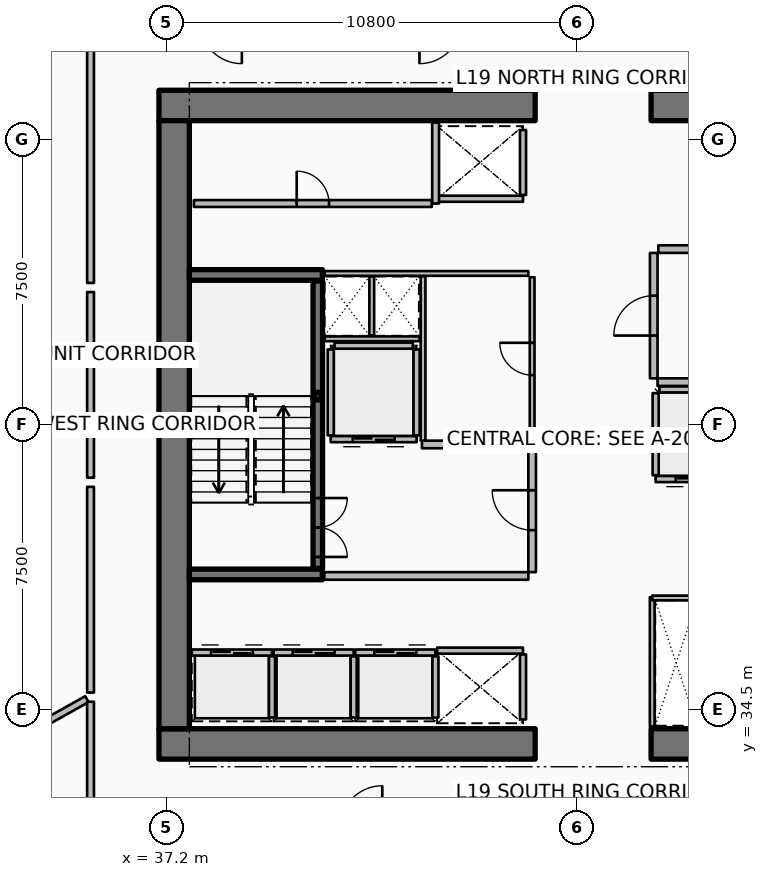
"""IFC4 building model, lengths in metres.
Left out: names, types, materials, properties, quantities, classifications, styles, units other than length and angle.
Written with IfcOpenShell. Run it as: python <this file> out.ifc"""

import sys

from ifc_helpers import new_model, si_unit, direction, frame, frame_2d, origin, origin_2d, place, context, subcontext, project, spatial, rectangle, hollow_rectangle, extrude, element, fill, save


model = new_model("IFC4")
c1 = context("Model", 3, precision=1e-05, world=origin(), true_north=direction((0.0, 1.0)))
c2 = subcontext(c1, "Body", "Model", "MODEL_VIEW")
j1 = project(units=[si_unit("LENGTHUNIT", "METRE"), si_unit("PLANEANGLEUNIT", "RADIAN")], contexts=[c1])
p1 = place(None, origin())
s1 = spatial("IfcSite", under=j1, at=p1, CompositionType="ELEMENT")
p2 = place(p1, origin())
s2 = spatial("IfcBuilding", under=s1, at=p2, CompositionType="ELEMENT")
p3 = place(p2, frame((0.0, 0.0, 78.9)))
s3 = spatial("IfcBuildingStorey", under=s2, at=p3, CompositionType="ELEMENT", Elevation=78.9)
p4 = place(p3, frame((37.0, 33.6, 0.0), z_axis=(0.0, 0.0, 1.0), x_axis=(1.0, 0.0, 0.0)))
e1 = element("IfcWall", 1, at=p4, inside=s3, PredefinedType="SHEAR", context=c2, shape_type="SweptSolid", body=[
    extrude(rectangle(XDim=9.9, YDim=0.8, at=frame_2d((4.95, 0.0))), origin(), (0.0, 0.0, 1.0), 3.75),
])
p5 = place(p3, frame((49.95, 33.6, 0.0), z_axis=(0.0, 0.0, 1.0), x_axis=(1.0, 0.0, 0.0)))
e2 = element("IfcWall", 2, at=p5, inside=s3, PredefinedType="SHEAR", context=c2, shape_type="SweptSolid", body=[
    extrude(rectangle(XDim=9.9, YDim=0.8, at=frame_2d((4.95, 0.0))), origin(), (0.0, 0.0, 1.0), 3.75),
])
p6 = place(p3, frame((37.0, 50.4, 0.0), z_axis=(0.0, 0.0, 1.0), x_axis=(1.0, 0.0, 0.0)))
e3 = element("IfcWall", 3, at=p6, inside=s3, PredefinedType="SHEAR", context=c2, shape_type="SweptSolid", body=[
    extrude(rectangle(XDim=9.9, YDim=0.8, at=frame_2d((4.95, 0.0))), origin(), (0.0, 0.0, 1.0), 3.75),
])
p7 = place(p3, frame((49.95, 50.4, 0.0), z_axis=(0.0, 0.0, 1.0), x_axis=(1.0, 0.0, 0.0)))
e4 = element("IfcWall", 4, at=p7, inside=s3, PredefinedType="SHEAR", context=c2, shape_type="SweptSolid", body=[
    extrude(rectangle(XDim=9.9, YDim=0.8, at=frame_2d((4.95, 0.0))), origin(), (0.0, 0.0, 1.0), 3.75),
])
p8 = place(p3, frame((37.4, 34.0, 0.0), z_axis=(0.0, 0.0, 1.0), x_axis=(0.0, 1.0, 0.0)))
e5 = element("IfcWall", 5, at=p8, inside=s3, PredefinedType="SHEAR", context=c2, shape_type="SweptSolid", body=[
    extrude(rectangle(XDim=16.0, YDim=0.8, at=frame_2d((8.0, 0.0))), origin(), (0.0, 0.0, 1.0), 3.75),
])
for number, where, z_axis, x_axis in (
    (6, (37.8, 38.06, 0.0), (0.0, 0.0, 1.0), (1.0, 0.0, 0.0)),
    (7, (37.8, 45.94, 0.0), (0.0, 0.0, 1.0), (1.0, 0.0, 0.0)),
):
    element("IfcWall", number, at=place(p3, frame(where, z_axis=z_axis, x_axis=x_axis)), inside=s3, PredefinedType="SHEAR", context=c2, shape_type="SweptSolid", body=[
        extrude(rectangle(XDim=3.5, YDim=0.28, at=frame_2d((1.75, 0.0))), origin(), (0.0, 0.0, 1.0), 3.75),
    ])
p9 = place(p3, frame((41.18, 42.75, 0.0), z_axis=(0.0, 0.0, 1.0), x_axis=(1.0, 0.0, 0.0)))
e8 = element("IfcColumn", 8, at=p9, inside=s3, PredefinedType="COLUMN", context=c2, shape_type="SweptSolid", body=[
    extrude(hollow_rectangle(XDim=0.2, YDim=0.2, WallThickness=0.01, InnerFilletRadius=0.01, OuterFilletRadius=0.02, at=origin_2d()), origin(), (0.0, 0.0, 1.0), 1.67),
])
p10 = place(p3, frame((41.18, 38.22, 0.0), z_axis=(0.0, 0.0, 1.0), x_axis=(0.0, 1.0, 0.0)))
e9 = element("IfcWall", 9, at=p10, inside=s3, PredefinedType="SOLIDWALL", context=c2, shape_type="SweptSolid", body=[
    extrude(rectangle(XDim=7.56, YDim=0.25, at=frame_2d((3.78, 0.0))), origin(), (0.0, 0.0, 1.0), 3.5),
])
p11 = place(p10, frame((0.3, 0.0, 0.0)))
e10 = element("IfcOpeningElement", 10, at=p11, cuts=e9, PredefinedType="OPENING", context=c2, shape_type="SweptSolid", body=[
    extrude(rectangle(XDim=1.55, YDim=2.15, at=frame_2d((0.775, 1.075))), frame((0.0, 0.135, 0.0), z_axis=(0.0, -1.0, 0.0), x_axis=(1.0, 0.0, 0.0)), (0.0, 0.0, 1.0), 0.27),
])
p12 = place(p3, frame((37.865, 36.005, 0.0), z_axis=(0.0, 0.0, 1.0), x_axis=(1.0, 0.0, 0.0)))
e11 = element("IfcWall", 11, at=p12, inside=s3, PredefinedType="PARTITIONING", context=c2, shape_type="SweptSolid", body=[
    extrude(rectangle(XDim=2.11, YDim=0.16, at=frame_2d((1.055, 0.0))), origin(), (0.0, 0.0, 1.0), 3.5),
])
p13 = place(p12, frame((0.505, 0.0, 0.0)))
e12 = element("IfcOpeningElement", 12, at=p13, cuts=e11, PredefinedType="OPENING", context=c2, shape_type="SweptSolid", body=[
    extrude(rectangle(XDim=1.1, YDim=2.1, at=frame_2d((0.55, 1.05))), frame((0.0, 0.09, 0.0), z_axis=(0.0, -1.0, 0.0), x_axis=(1.0, 0.0, 0.0)), (0.0, 0.0, 1.0), 0.18),
])
p14 = place(p3, frame((39.975, 34.295, 0.0), z_axis=(0.0, 0.0, 1.0), x_axis=(0.0, 1.0, 0.0)))
e13 = element("IfcWall", 13, at=p14, inside=s3, PredefinedType="PARTITIONING", context=c2, shape_type="SweptSolid", body=[
    extrude(rectangle(XDim=1.61, YDim=0.16, at=frame_2d((0.805, 0.0))), origin(), (0.0, 0.0, 1.0), 3.5),
])
p15 = place(p3, frame((40.015, 36.005, 0.0), z_axis=(0.0, 0.0, 1.0), x_axis=(1.0, 0.0, 0.0)))
e14 = element("IfcWall", 14, at=p15, inside=s3, PredefinedType="PARTITIONING", context=c2, shape_type="SweptSolid", body=[
    extrude(rectangle(XDim=2.11, YDim=0.16, at=frame_2d((1.055, 0.0))), origin(), (0.0, 0.0, 1.0), 3.5),
])
p16 = place(p15, frame((0.505, 0.0, 0.0)))
e15 = element("IfcOpeningElement", 15, at=p16, cuts=e14, PredefinedType="OPENING", context=c2, shape_type="SweptSolid", body=[
    extrude(rectangle(XDim=1.1, YDim=2.1, at=frame_2d((0.55, 1.05))), frame((0.0, 0.09, 0.0), z_axis=(0.0, -1.0, 0.0), x_axis=(1.0, 0.0, 0.0)), (0.0, 0.0, 1.0), 0.18),
])
p17 = place(p3, frame((42.125, 34.295, 0.0), z_axis=(0.0, 0.0, 1.0), x_axis=(0.0, 1.0, 0.0)))
e16 = element("IfcWall", 16, at=p17, inside=s3, PredefinedType="PARTITIONING", context=c2, shape_type="SweptSolid", body=[
    extrude(rectangle(XDim=1.61, YDim=0.16, at=frame_2d((0.805, 0.0))), origin(), (0.0, 0.0, 1.0), 3.5),
])
p18 = place(p3, frame((42.165, 36.005, 0.0), z_axis=(0.0, 0.0, 1.0), x_axis=(1.0, 0.0, 0.0)))
e17 = element("IfcWall", 17, at=p18, inside=s3, PredefinedType="PARTITIONING", context=c2, shape_type="SweptSolid", body=[
    extrude(rectangle(XDim=2.11, YDim=0.16, at=frame_2d((1.055, 0.0))), origin(), (0.0, 0.0, 1.0), 3.5),
])
p19 = place(p18, frame((0.505, 0.0, 0.0)))
e18 = element("IfcOpeningElement", 18, at=p19, cuts=e17, PredefinedType="OPENING", context=c2, shape_type="SweptSolid", body=[
    extrude(rectangle(XDim=1.1, YDim=2.1, at=frame_2d((0.55, 1.05))), frame((0.0, 0.09, 0.0), z_axis=(0.0, -1.0, 0.0), x_axis=(1.0, 0.0, 0.0)), (0.0, 0.0, 1.0), 0.18),
])
p20 = place(p3, frame((44.275, 34.295, 0.0), z_axis=(0.0, 0.0, 1.0), x_axis=(0.0, 1.0, 0.0)))
e19 = element("IfcWall", 19, at=p20, inside=s3, PredefinedType="PARTITIONING", context=c2, shape_type="SweptSolid", body=[
    extrude(rectangle(XDim=1.61, YDim=0.16, at=frame_2d((0.805, 0.0))), origin(), (0.0, 0.0, 1.0), 3.5),
])
p21 = place(p3, frame((46.58, 47.945, 0.0), z_axis=(0.0, 0.0, 1.0), x_axis=(-1.0, 0.0, 0.0)))
e20 = element("IfcWall", 20, at=p21, inside=s3, PredefinedType="PARTITIONING", context=c2, shape_type="SweptSolid", body=[
    extrude(rectangle(XDim=2.26, YDim=0.16, at=frame_2d((1.13, 0.0))), origin(), (0.0, 0.0, 1.0), 3.5),
])
p22 = place(p3, frame((46.58, 48.045, 0.0), z_axis=(0.0, 0.0, 1.0), x_axis=(0.0, 1.0, 0.0)))
e21 = element("IfcWall", 21, at=p22, inside=s3, PredefinedType="PARTITIONING", context=c2, shape_type="SweptSolid", body=[
    extrude(rectangle(XDim=1.71, YDim=0.16, at=frame_2d((0.855, 0.0))), origin(), (0.0, 0.0, 1.0), 3.5),
])
p23 = place(p3, frame((44.32, 36.055, 0.0), z_axis=(0.0, 0.0, 1.0), x_axis=(1.0, 0.0, 0.0)))
e22 = element("IfcWall", 22, at=p23, inside=s3, PredefinedType="PARTITIONING", context=c2, shape_type="SweptSolid", body=[
    extrude(rectangle(XDim=2.26, YDim=0.16, at=frame_2d((1.13, 0.0))), origin(), (0.0, 0.0, 1.0), 3.5),
])
p24 = place(p3, frame((46.58, 34.245, 0.0), z_axis=(0.0, 0.0, 1.0), x_axis=(0.0, 1.0, 0.0)))
e23 = element("IfcWall", 23, at=p24, inside=s3, PredefinedType="PARTITIONING", context=c2, shape_type="SweptSolid", body=[
    extrude(rectangle(XDim=1.71, YDim=0.16, at=frame_2d((0.855, 0.0))), origin(), (0.0, 0.0, 1.0), 3.5),
])
p25 = place(p3, frame((43.78, 41.62, 0.0), z_axis=(0.0, 0.0, 1.0), x_axis=(-1.0, 0.0, 0.0)))
e24 = element("IfcWall", 24, at=p25, inside=s3, PredefinedType="PARTITIONING", context=c2, shape_type="SweptSolid", body=[
    extrude(rectangle(XDim=2.26, YDim=0.16, at=frame_2d((1.13, 0.0))), origin(), (0.0, 0.0, 1.0), 3.5),
])
p26 = place(p25, frame((0.58, 0.0, 0.0)))
e25 = element("IfcOpeningElement", 25, at=p26, cuts=e24, PredefinedType="OPENING", context=c2, shape_type="SweptSolid", body=[
    extrude(rectangle(XDim=1.1, YDim=2.1, at=frame_2d((0.55, 1.05))), frame((0.0, 0.09, 0.0), z_axis=(0.0, -1.0, 0.0), x_axis=(1.0, 0.0, 0.0)), (0.0, 0.0, 1.0), 0.18),
])
for number, where, z_axis, x_axis in (
    (26, (43.78, 41.72, 0.0), (0.0, 0.0, 1.0), (0.0, 1.0, 0.0)),
    (27, (41.52, 41.72, 0.0), (0.0, 0.0, 1.0), (0.0, 1.0, 0.0)),
):
    element("IfcWall", number, at=place(p3, frame(where, z_axis=z_axis, x_axis=x_axis)), inside=s3, PredefinedType="PARTITIONING", context=c2, shape_type="SweptSolid", body=[
        extrude(rectangle(XDim=2.26, YDim=0.16, at=frame_2d((1.13, 0.0))), origin(), (0.0, 0.0, 1.0), 3.5),
    ])
p27 = place(p3, frame((41.62, 44.08, 0.0), z_axis=(0.0, 0.0, 1.0), x_axis=(1.0, 0.0, 0.0)))
e28 = element("IfcWall", 28, at=p27, inside=s3, PredefinedType="PARTITIONING", context=c2, shape_type="SweptSolid", body=[
    extrude(rectangle(XDim=2.06, YDim=0.16, at=frame_2d((1.03, 0.0))), origin(), (0.0, 0.0, 1.0), 3.5),
])
p28 = place(p3, frame((52.23, 40.57, 0.0), z_axis=(0.0, 0.0, 1.0), x_axis=(-1.0, 0.0, 0.0)))
e29 = element("IfcWall", 29, at=p28, inside=s3, PredefinedType="PARTITIONING", context=c2, shape_type="SweptSolid", body=[
    extrude(rectangle(XDim=2.16, YDim=0.16, at=frame_2d((1.08, 0.0))), origin(), (0.0, 0.0, 1.0), 3.5),
])
p29 = place(p28, frame((0.53, 0.0, 0.0)))
e30 = element("IfcOpeningElement", 30, at=p29, cuts=e29, PredefinedType="OPENING", context=c2, shape_type="SweptSolid", body=[
    extrude(rectangle(XDim=1.1, YDim=2.1, at=frame_2d((0.55, 1.05))), frame((0.0, 0.09, 0.0), z_axis=(0.0, -1.0, 0.0), x_axis=(1.0, 0.0, 0.0)), (0.0, 0.0, 1.0), 0.18),
])
p30 = place(p3, frame((50.07, 40.67, 0.0), z_axis=(0.0, 0.0, 1.0), x_axis=(0.0, 1.0, 0.0)))
e31 = element("IfcWall", 31, at=p30, inside=s3, PredefinedType="PARTITIONING", context=c2, shape_type="SweptSolid", body=[
    extrude(rectangle(XDim=2.16, YDim=0.16, at=frame_2d((1.08, 0.0))), origin(), (0.0, 0.0, 1.0), 3.5),
])
p31 = place(p3, frame((50.17, 42.93, 0.0), z_axis=(0.0, 0.0, 1.0), x_axis=(1.0, 0.0, 0.0)))
e32 = element("IfcWall", 32, at=p31, inside=s3, PredefinedType="PARTITIONING", context=c2, shape_type="SweptSolid", body=[
    extrude(rectangle(XDim=1.96, YDim=0.16, at=frame_2d((0.98, 0.0))), origin(), (0.0, 0.0, 1.0), 3.5),
])
p32 = place(p3, frame((37.92, 47.82, 0.0), z_axis=(0.0, 0.0, 1.0), x_axis=(1.0, 0.0, 0.0)))
e33 = element("IfcWall", 33, at=p32, inside=s3, PredefinedType="PARTITIONING", context=c2, shape_type="SweptSolid", body=[
    extrude(rectangle(XDim=6.26, YDim=0.18, at=frame_2d((3.13, 0.0))), origin(), (0.0, 0.0, 1.0), 3.5),
])
p33 = place(p32, frame((2.705, 0.0, 0.0)))
e34 = element("IfcOpeningElement", 34, at=p33, cuts=e33, PredefinedType="OPENING", context=c2, shape_type="SweptSolid", body=[
    extrude(rectangle(XDim=0.85, YDim=2.06, at=frame_2d((0.425, 1.03))), frame((0.0, 0.1, 0.0), z_axis=(0.0, -1.0, 0.0), x_axis=(1.0, 0.0, 0.0)), (0.0, 0.0, 1.0), 0.2),
])
p34 = place(p3, frame((44.28, 47.82, 0.0), z_axis=(0.0, 0.0, 1.0), x_axis=(0.0, 1.0, 0.0)))
e35 = element("IfcWall", 35, at=p34, inside=s3, PredefinedType="PARTITIONING", context=c2, shape_type="SweptSolid", body=[
    extrude(rectangle(XDim=2.13, YDim=0.18, at=frame_2d((1.065, 0.0))), origin(), (0.0, 0.0, 1.0), 3.5),
])
p35 = place(p3, frame((41.35, 38.02, 0.0), z_axis=(0.0, 0.0, 1.0), x_axis=(1.0, 0.0, 0.0)))
e36 = element("IfcWall", 36, at=p35, inside=s3, PredefinedType="PARTITIONING", context=c2, shape_type="SweptSolid", body=[
    extrude(rectangle(XDim=5.37, YDim=0.2, at=frame_2d((2.685, 0.0))), origin(), (0.0, 0.0, 1.0), 3.5),
])
p36 = place(p3, frame((43.92, 41.48, 0.0), z_axis=(0.0, 0.0, 1.0), x_axis=(1.0, 0.0, 0.0)))
e37 = element("IfcWall", 37, at=p36, inside=s3, PredefinedType="PARTITIONING", context=c2, shape_type="SweptSolid", body=[
    extrude(rectangle(XDim=2.8, YDim=0.2, at=frame_2d((1.4, 0.0))), origin(), (0.0, 0.0, 1.0), 3.5),
])
p37 = place(p3, frame((46.82, 38.12, 0.0), z_axis=(0.0, 0.0, 1.0), x_axis=(0.0, 1.0, 0.0)))
e38 = element("IfcWall", 38, at=p37, inside=s3, PredefinedType="PARTITIONING", context=c2, shape_type="SweptSolid", body=[
    extrude(rectangle(XDim=3.26, YDim=0.2, at=frame_2d((1.63, 0.0))), origin(), (0.0, 0.0, 1.0), 3.5),
])
p38 = place(p37, frame((1.105, 0.0, 0.0)))
e39 = element("IfcOpeningElement", 39, at=p38, cuts=e38, PredefinedType="OPENING", context=c2, shape_type="SweptSolid", body=[
    extrude(rectangle(XDim=1.05, YDim=2.1, at=frame_2d((0.525, 1.05))), frame((0.0, 0.11, 0.0), z_axis=(0.0, -1.0, 0.0), x_axis=(1.0, 0.0, 0.0)), (0.0, 0.0, 1.0), 0.22),
])
p39 = place(p3, frame((50.12, 43.12, 0.0), z_axis=(0.0, 0.0, 1.0), x_axis=(1.0, 0.0, 0.0)))
e40 = element("IfcWall", 40, at=p39, inside=s3, PredefinedType="PARTITIONING", context=c2, shape_type="SweptSolid", body=[
    extrude(rectangle(XDim=8.88, YDim=0.2, at=frame_2d((4.44, 0.0))), origin(), (0.0, 0.0, 1.0), 3.5),
])
p40 = place(p3, frame((50.14, 46.62, 0.0), z_axis=(0.0, 0.0, 1.0), x_axis=(1.0, 0.0, 0.0)))
e41 = element("IfcWall", 41, at=p40, inside=s3, PredefinedType="PARTITIONING", context=c2, shape_type="SweptSolid", body=[
    extrude(rectangle(XDim=1.02, YDim=0.2, at=frame_2d((0.51, 0.0))), origin(), (0.0, 0.0, 1.0), 3.5),
])
p41 = place(p3, frame((50.02, 43.22, 0.0), z_axis=(0.0, 0.0, 1.0), x_axis=(0.0, 1.0, 0.0)))
e42 = element("IfcWall", 42, at=p41, inside=s3, PredefinedType="PARTITIONING", context=c2, shape_type="SweptSolid", body=[
    extrude(rectangle(XDim=3.3, YDim=0.2, at=frame_2d((1.65, 0.0))), origin(), (0.0, 0.0, 1.0), 3.5),
])
p42 = place(p41, frame((1.125, 0.0, 0.0)))
e43 = element("IfcOpeningElement", 43, at=p42, cuts=e42, PredefinedType="OPENING", context=c2, shape_type="SweptSolid", body=[
    extrude(rectangle(XDim=1.05, YDim=2.1, at=frame_2d((0.525, 1.05))), frame((0.0, 0.11, 0.0), z_axis=(0.0, -1.0, 0.0), x_axis=(1.0, 0.0, 0.0)), (0.0, 0.0, 1.0), 0.22),
])
p43 = place(p3, frame((41.36, 45.98, 0.0), z_axis=(0.0, 0.0, 1.0), x_axis=(1.0, 0.0, 0.0)))
e44 = element("IfcWall", 44, at=p43, inside=s3, PredefinedType="PARTITIONING", context=c2, shape_type="SweptSolid", body=[
    extrude(rectangle(XDim=5.36, YDim=0.125, at=frame_2d((2.68, 0.0))), origin(), (0.0, 0.0, 1.0), 2.94),
])
p44 = place(p3, frame((41.36, 44.26, 0.0), z_axis=(0.0, 0.0, 1.0), x_axis=(1.0, 0.0, 0.0)))
e45 = element("IfcWall", 45, at=p44, inside=s3, PredefinedType="PARTITIONING", context=c2, shape_type="SweptSolid", body=[
    extrude(rectangle(XDim=2.5, YDim=0.125, at=frame_2d((1.25, 0.0))), origin(), (0.0, 0.0, 1.0), 2.94),
])
p45 = place(p3, frame((42.6, 44.35, 0.0), z_axis=(0.0, 0.0, 1.0), x_axis=(0.0, 1.0, 0.0)))
e46 = element("IfcWall", 46, at=p45, inside=s3, PredefinedType="PARTITIONING", context=c2, shape_type="SweptSolid", body=[
    extrude(rectangle(XDim=1.55, YDim=0.125, at=frame_2d((0.775, 0.0))), origin(), (0.0, 0.0, 1.0), 2.94),
])
p46 = place(p3, frame((49.98, 34.06, 0.0), z_axis=(0.0, 0.0, 1.0), x_axis=(0.0, 1.0, 0.0)))
e47 = element("IfcWall", 47, at=p46, inside=s3, PredefinedType="PARTITIONING", context=c2, shape_type="SweptSolid", body=[
    extrude(rectangle(XDim=3.4, YDim=0.125, at=frame_2d((1.7, 0.0))), origin(), (0.0, 0.0, 1.0), 2.94),
])
p47 = place(p3, frame((49.98, 37.44, 0.0), z_axis=(0.0, 0.0, 1.0), x_axis=(1.0, 0.0, 0.0)))
e48 = element("IfcWall", 48, at=p47, inside=s3, PredefinedType="PARTITIONING", context=c2, shape_type="SweptSolid", body=[
    extrude(rectangle(XDim=1.26, YDim=0.125, at=frame_2d((0.63, 0.0))), origin(), (0.0, 0.0, 1.0), 2.94),
])
p48 = place(p3, frame((43.95, 41.58, 0.0), z_axis=(0.0, 0.0, 1.0), x_axis=(0.0, 1.0, 0.0)))
e49 = element("IfcWall", 49, at=p48, inside=s3, PredefinedType="PARTITIONING", context=c2, shape_type="SweptSolid", body=[
    extrude(rectangle(XDim=4.32, YDim=0.125, at=frame_2d((2.16, 0.0))), origin(), (0.0, 0.0, 1.0), 2.94),
])
p49 = place(p3, frame((46.82, 41.58, 0.0), z_axis=(0.0, 0.0, 1.0), x_axis=(0.0, 1.0, 0.0)))
e50 = element("IfcWall", 50, at=p49, inside=s3, PredefinedType="PARTITIONING", context=c2, shape_type="SweptSolid", body=[
    extrude(rectangle(XDim=4.3, YDim=0.125, at=frame_2d((2.15, 0.0))), origin(), (0.0, 0.0, 1.0), 2.94),
])
p50 = place(p49, frame((1.725, 0.0, 0.0)))
e51 = element("IfcOpeningElement", 51, at=p50, cuts=e50, PredefinedType="OPENING", context=c2, shape_type="SweptSolid", body=[
    extrude(rectangle(XDim=0.85, YDim=2.06, at=frame_2d((0.425, 1.03))), frame((0.0, 0.073, 0.0), z_axis=(0.0, -1.0, 0.0), x_axis=(1.0, 0.0, 0.0)), (0.0, 0.0, 1.0), 0.145),
])
p51 = place(p3, frame((35.104, 34.778, 0.0), z_axis=(0.0, 0.0, 1.0), x_axis=(-0.872490437896, -0.488631185845, 0.0)))
e52 = element("IfcWall", 52, at=p51, inside=s3, PredefinedType="PARTITIONING", context=c2, shape_type="SweptSolid", body=[
    extrude(rectangle(XDim=14.699, YDim=0.18, at=frame_2d((7.35, 0.0))), origin(), (0.0, 0.0, 1.0), 2.94),
])
p52 = place(p3, frame((35.2, 51.971, 0.0), z_axis=(0.0, 0.0, 1.0), x_axis=(0.0, -1.0, 0.0)))
e53 = element("IfcWall", 53, at=p52, inside=s3, PredefinedType="PARTITIONING", context=c2, shape_type="SweptSolid", body=[
    extrude(rectangle(XDim=6.241, YDim=0.18, at=frame_2d((3.12, 0.0))), origin(), (0.0, 0.0, 1.0), 2.94),
])
p53 = place(p3, frame((35.2, 45.49, 0.0), z_axis=(0.0, 0.0, 1.0), x_axis=(0.0, -1.0, 0.0)))
e54 = element("IfcWall", 54, at=p53, inside=s3, PredefinedType="PARTITIONING", context=c2, shape_type="SweptSolid", body=[
    extrude(rectangle(XDim=4.885, YDim=0.18, at=frame_2d((2.442, 0.0))), origin(), (0.0, 0.0, 1.0), 2.94),
])
p54 = place(p3, frame((35.2, 40.365, 0.0), z_axis=(0.0, 0.0, 1.0), x_axis=(0.0, -1.0, 0.0)))
e55 = element("IfcWall", 55, at=p54, inside=s3, PredefinedType="PARTITIONING", context=c2, shape_type="SweptSolid", body=[
    extrude(rectangle(XDim=5.413, YDim=0.18, at=frame_2d((2.707, 0.0))), origin(), (0.0, 0.0, 1.0), 2.94),
])
p55 = place(p3, frame((35.2, 34.712, 0.0), z_axis=(0.0, 0.0, 1.0), x_axis=(0.0, -1.0, 0.0)))
e56 = element("IfcWall", 56, at=p55, inside=s3, PredefinedType="PARTITIONING", context=c2, shape_type="SweptSolid", body=[
    extrude(rectangle(XDim=3.192, YDim=0.18, at=frame_2d((1.596, 0.0))), origin(), (0.0, 0.0, 1.0), 2.94),
])
p56 = place(p11, origin())
e57 = element("IfcDoor", 57, at=p56, inside=s3, OperationType="DOUBLE_DOOR_SINGLE_SWING", PredefinedType="DOOR", context=c2, shape_type="SweptSolid", body=[
    extrude(rectangle(XDim=1.55, YDim=2.15, at=frame_2d((0.775, 1.075))), frame((0.0, 0.025, 0.0), z_axis=(0.0, -1.0, 0.0), x_axis=(1.0, 0.0, 0.0)), (0.0, 0.0, 1.0), 0.05),
])
fill(e10, e57)
p57 = place(p13, origin())
e58 = element("IfcDoor", 58, at=p57, inside=s3, OperationType="DOUBLE_DOOR_SLIDING", PredefinedType="DOOR", context=c2, shape_type="SweptSolid", body=[
    extrude(rectangle(XDim=1.1, YDim=2.1, at=frame_2d((0.55, 1.05))), frame((0.0, 0.025, 0.0), z_axis=(0.0, -1.0, 0.0), x_axis=(1.0, 0.0, 0.0)), (0.0, 0.0, 1.0), 0.05),
])
fill(e12, e58)
p58 = place(p16, origin())
e59 = element("IfcDoor", 59, at=p58, inside=s3, OperationType="DOUBLE_DOOR_SLIDING", PredefinedType="DOOR", context=c2, shape_type="SweptSolid", body=[
    extrude(rectangle(XDim=1.1, YDim=2.1, at=frame_2d((0.55, 1.05))), frame((0.0, 0.025, 0.0), z_axis=(0.0, -1.0, 0.0), x_axis=(1.0, 0.0, 0.0)), (0.0, 0.0, 1.0), 0.05),
])
fill(e15, e59)
p59 = place(p19, origin())
e60 = element("IfcDoor", 60, at=p59, inside=s3, OperationType="DOUBLE_DOOR_SLIDING", PredefinedType="DOOR", context=c2, shape_type="SweptSolid", body=[
    extrude(rectangle(XDim=1.1, YDim=2.1, at=frame_2d((0.55, 1.05))), frame((0.0, 0.025, 0.0), z_axis=(0.0, -1.0, 0.0), x_axis=(1.0, 0.0, 0.0)), (0.0, 0.0, 1.0), 0.05),
])
fill(e18, e60)
p60 = place(p26, origin())
e61 = element("IfcDoor", 61, at=p60, inside=s3, OperationType="DOUBLE_DOOR_SLIDING", PredefinedType="DOOR", context=c2, shape_type="SweptSolid", body=[
    extrude(rectangle(XDim=1.1, YDim=2.1, at=frame_2d((0.55, 1.05))), frame((0.0, 0.025, 0.0), z_axis=(0.0, -1.0, 0.0), x_axis=(1.0, 0.0, 0.0)), (0.0, 0.0, 1.0), 0.05),
])
fill(e25, e61)
p61 = place(p29, origin())
e62 = element("IfcDoor", 62, at=p61, inside=s3, OperationType="DOUBLE_DOOR_SLIDING", PredefinedType="DOOR", context=c2, shape_type="SweptSolid", body=[
    extrude(rectangle(XDim=1.1, YDim=2.1, at=frame_2d((0.55, 1.05))), frame((0.0, 0.025, 0.0), z_axis=(0.0, -1.0, 0.0), x_axis=(1.0, 0.0, 0.0)), (0.0, 0.0, 1.0), 0.05),
])
fill(e30, e62)
p62 = place(p33, origin())
e63 = element("IfcDoor", 63, at=p62, inside=s3, OperationType="SINGLE_SWING_LEFT", PredefinedType="DOOR", context=c2, shape_type="SweptSolid", body=[
    extrude(rectangle(XDim=0.85, YDim=2.06, at=frame_2d((0.425, 1.03))), frame((0.0, 0.025, 0.0), z_axis=(0.0, -1.0, 0.0), x_axis=(1.0, 0.0, 0.0)), (0.0, 0.0, 1.0), 0.05),
])
fill(e34, e63)
p63 = place(p38, origin())
e64 = element("IfcDoor", 64, at=p63, inside=s3, OperationType="SINGLE_SWING_RIGHT", PredefinedType="DOOR", context=c2, shape_type="SweptSolid", body=[
    extrude(rectangle(XDim=1.05, YDim=2.1, at=frame_2d((0.525, 1.05))), frame((0.0, 0.025, 0.0), z_axis=(0.0, -1.0, 0.0), x_axis=(1.0, 0.0, 0.0)), (0.0, 0.0, 1.0), 0.05),
])
fill(e39, e64)
p64 = place(p42, origin())
e65 = element("IfcDoor", 65, at=p64, inside=s3, OperationType="SINGLE_SWING_LEFT", PredefinedType="DOOR", context=c2, shape_type="SweptSolid", body=[
    extrude(rectangle(XDim=1.05, YDim=2.1, at=frame_2d((0.525, 1.05))), frame((0.0, 0.025, 0.0), z_axis=(0.0, -1.0, 0.0), x_axis=(1.0, 0.0, 0.0)), (0.0, 0.0, 1.0), 0.05),
])
fill(e43, e65)
p65 = place(p50, origin())
e66 = element("IfcDoor", 66, at=p65, inside=s3, OperationType="SINGLE_SWING_RIGHT", PredefinedType="DOOR", context=c2, shape_type="SweptSolid", body=[
    extrude(rectangle(XDim=0.85, YDim=2.06, at=frame_2d((0.425, 1.03))), frame((0.0, 0.025, 0.0), z_axis=(0.0, -1.0, 0.0), x_axis=(1.0, 0.0, 0.0)), (0.0, 0.0, 1.0), 0.05),
])
fill(e51, e66)
save(model, sys.argv[1])
